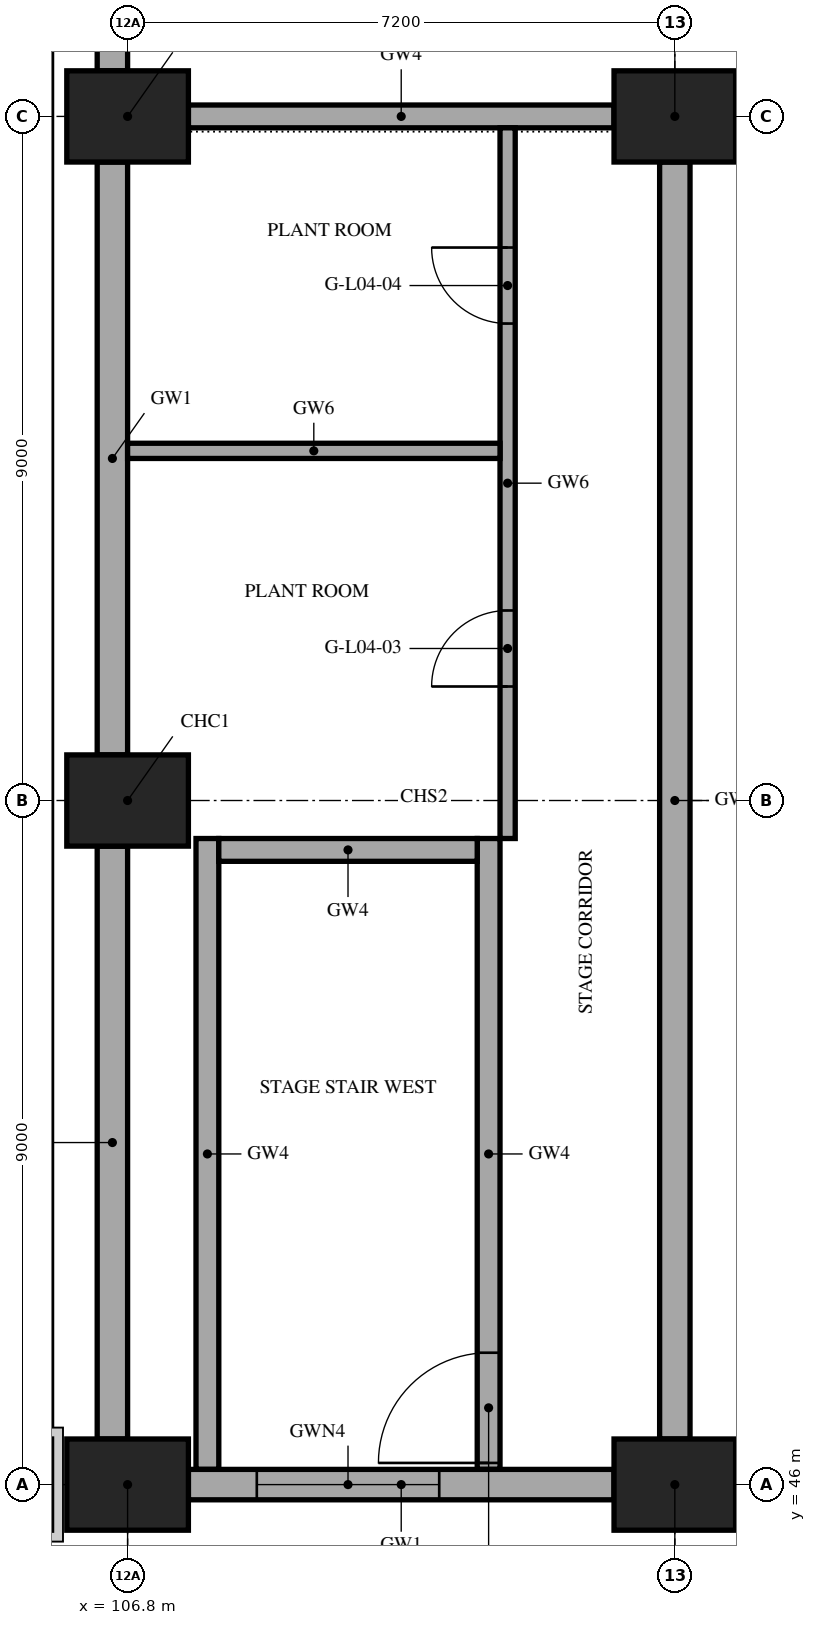
"""IFC4 building model, lengths in metres.
Left out: names, types, materials, properties, quantities, classifications, styles, units other than length and angle.
Written with IfcOpenShell. Run it as: python <this file> out.ifc"""

import sys

from ifc_helpers import new_model, si_unit, direction, frame, frame_2d, origin, origin_2d, place, context, subcontext, project, spatial, rectangle, extrude, element, fill, save


model = new_model("IFC4")
c1 = context("Model", 3, precision=1e-05, world=origin(), true_north=direction((0.0, 1.0)))
c2 = subcontext(c1, "Body", "Model", "MODEL_VIEW")
j1 = project(units=[si_unit("LENGTHUNIT", "METRE"), si_unit("PLANEANGLEUNIT", "RADIAN")], contexts=[c1])
p1 = place(None, origin())
s1 = spatial("IfcSite", under=j1, at=p1, CompositionType="ELEMENT")
p2 = place(p1, origin())
s2 = spatial("IfcBuilding", under=s1, at=p2, CompositionType="ELEMENT")
p3 = place(p2, frame((0.0, 0.0, 19.2)))
s3 = spatial("IfcBuildingStorey", under=s2, at=p3, CompositionType="ELEMENT", Elevation=19.2)
for number, where, z_axis, x_axis in (
    (1, (106.8, 46.0, 0.0), (0.0, 0.0, 1.0), (1.0, 0.0, 0.0)),
    (2, (114.0, 46.0, 0.0), (0.0, 0.0, 1.0), (1.0, 0.0, 0.0)),
    (3, (106.8, 55.0, 0.0), (0.0, 0.0, 1.0), (1.0, 0.0, 0.0)),
    (4, (106.8, 64.0, 0.0), (0.0, 0.0, 1.0), (1.0, 0.0, 0.0)),
    (5, (114.0, 64.0, 0.0), (0.0, 0.0, 1.0), (1.0, 0.0, 0.0)),
):
    element("IfcColumn", number, at=place(p3, frame(where, z_axis=z_axis, x_axis=x_axis)), inside=s3, PredefinedType="COLUMN", context=c2, shape_type="SweptSolid", body=[
        extrude(rectangle(XDim=1.6, YDim=1.2, at=origin_2d()), origin(), (0.0, 0.0, 1.0), 4.2),
    ])
p4 = place(p3, frame((114.0, 46.6, 0.0), z_axis=(0.0, 0.0, 1.0), x_axis=(0.0, 1.0, 0.0)))
e6 = element("IfcWall", 6, at=p4, inside=s3, PredefinedType="SHEAR", context=c2, shape_type="SweptSolid", body=[
    extrude(rectangle(XDim=16.8, YDim=0.4, at=frame_2d((8.4, 0.0))), origin(), (0.0, 0.0, 1.0), 4.2),
])
p5 = place(p3, frame((107.6, 64.0, 0.0), z_axis=(0.0, 0.0, 1.0), x_axis=(1.0, 0.0, 0.0)))
e7 = element("IfcWall", 7, at=p5, inside=s3, PredefinedType="SHEAR", context=c2, shape_type="SweptSolid", body=[
    extrude(rectangle(XDim=5.6, YDim=0.3, at=frame_2d((2.8, 0.0))), origin(), (0.0, 0.0, 1.0), 4.2),
])
p6 = place(p3, frame((107.85, 46.2, 0.0), z_axis=(0.0, 0.0, 1.0), x_axis=(0.0, 1.0, 0.0)))
e8 = element("IfcWall", 8, at=p6, inside=s3, PredefinedType="SHEAR", context=c2, shape_type="SweptSolid", body=[
    extrude(rectangle(XDim=8.3, YDim=0.3, at=frame_2d((4.15, 0.0))), origin(), (0.0, 0.0, 1.0), 4.2),
])
p7 = place(p3, frame((111.55, 46.2, 0.0), z_axis=(0.0, 0.0, 1.0), x_axis=(0.0, 1.0, 0.0)))
e9 = element("IfcWall", 9, at=p7, inside=s3, PredefinedType="SHEAR", context=c2, shape_type="SweptSolid", body=[
    extrude(rectangle(XDim=8.3, YDim=0.3, at=frame_2d((4.15, 0.0))), origin(), (0.0, 0.0, 1.0), 4.2),
])
p8 = place(p7, frame((0.085, 0.0, 0.0)))
e10 = element("IfcOpeningElement", 10, at=p8, cuts=e9, PredefinedType="OPENING", context=c2, shape_type="SweptSolid", body=[
    extrude(rectangle(XDim=1.45, YDim=2.1, at=frame_2d((0.725, 1.05))), frame((0.0, 0.16, 0.0), z_axis=(0.0, -1.0, 0.0), x_axis=(1.0, 0.0, 0.0)), (0.0, 0.0, 1.0), 0.32),
])
p9 = place(p3, frame((108.0, 54.35, 0.0), z_axis=(0.0, 0.0, 1.0), x_axis=(1.0, 0.0, 0.0)))
e11 = element("IfcWall", 11, at=p9, inside=s3, PredefinedType="SHEAR", context=c2, shape_type="SweptSolid", body=[
    extrude(rectangle(XDim=3.4, YDim=0.3, at=frame_2d((1.7, 0.0))), origin(), (0.0, 0.0, 1.0), 4.2),
])
for number, where, z_axis, x_axis in (
    (12, (106.6, 46.6, 0.0), (0.0, 0.0, 1.0), (0.0, 1.0, 0.0)),
    (13, (106.6, 55.6, 0.0), (0.0, 0.0, 1.0), (0.0, 1.0, 0.0)),
):
    element("IfcWall", number, at=place(p3, frame(where, z_axis=z_axis, x_axis=x_axis)), inside=s3, PredefinedType="SOLIDWALL", context=c2, shape_type="SweptSolid", body=[
        extrude(rectangle(XDim=7.8, YDim=0.4, at=frame_2d((3.9, 0.0))), origin(), (0.0, 0.0, 1.0), 4.2),
    ])
p10 = place(p3, frame((106.6, 64.6, 0.0), z_axis=(0.0, 0.0, 1.0), x_axis=(0.0, 1.0, 0.0)))
e14 = element("IfcWall", 14, at=p10, inside=s3, PredefinedType="SOLIDWALL", context=c2, shape_type="SweptSolid", body=[
    extrude(rectangle(XDim=7.8, YDim=0.4, at=frame_2d((3.9, 0.0))), origin(), (0.0, 0.0, 1.0), 4.2),
])
p11 = place(p10, frame((0.9, 0.0, 2.4)))
e15 = element("IfcOpeningElement", 15, at=p11, cuts=e14, PredefinedType="OPENING", context=c2, shape_type="SweptSolid", body=[
    extrude(rectangle(XDim=6.0, YDim=1.4, at=frame_2d((3.0, 0.7))), frame((0.0, 0.21, 0.0), z_axis=(0.0, -1.0, 0.0), x_axis=(1.0, 0.0, 0.0)), (0.0, 0.0, 1.0), 0.42),
])
p12 = place(p3, frame((107.6, 46.0, 0.0), z_axis=(0.0, 0.0, 1.0), x_axis=(1.0, 0.0, 0.0)))
e16 = element("IfcWall", 16, at=p12, inside=s3, PredefinedType="SOLIDWALL", context=c2, shape_type="SweptSolid", body=[
    extrude(rectangle(XDim=5.6, YDim=0.4, at=frame_2d((2.8, 0.0))), origin(), (0.0, 0.0, 1.0), 4.2),
])
p13 = place(p12, frame((0.9, 0.0, 1.2)))
e17 = element("IfcOpeningElement", 17, at=p13, cuts=e16, PredefinedType="OPENING", context=c2, shape_type="SweptSolid", body=[
    extrude(rectangle(XDim=2.4, YDim=1.8, at=frame_2d((1.2, 0.9))), frame((0.0, 0.21, 0.0), z_axis=(0.0, -1.0, 0.0), x_axis=(1.0, 0.0, 0.0)), (0.0, 0.0, 1.0), 0.42),
])
p14 = place(p3, frame((111.8, 54.5, 0.0), z_axis=(0.0, 0.0, 1.0), x_axis=(0.0, 1.0, 0.0)))
e18 = element("IfcWall", 18, at=p14, inside=s3, PredefinedType="PARTITIONING", context=c2, shape_type="SweptSolid", body=[
    extrude(rectangle(XDim=9.35, YDim=0.2, at=frame_2d((4.675, 0.0))), origin(), (0.0, 0.0, 1.0), 4.2),
])
p15 = place(p14, frame((2.0, 0.0, 0.0)))
e19 = element("IfcOpeningElement", 19, at=p15, cuts=e18, PredefinedType="OPENING", context=c2, shape_type="SweptSolid", body=[
    extrude(rectangle(XDim=1.0, YDim=2.1, at=frame_2d((0.5, 1.05))), frame((0.0, 0.11, 0.0), z_axis=(0.0, -1.0, 0.0), x_axis=(1.0, 0.0, 0.0)), (0.0, 0.0, 1.0), 0.22),
])
p16 = place(p14, frame((6.775, 0.0, 0.0)))
e20 = element("IfcOpeningElement", 20, at=p16, cuts=e18, PredefinedType="OPENING", context=c2, shape_type="SweptSolid", body=[
    extrude(rectangle(XDim=1.0, YDim=2.1, at=frame_2d((0.5, 1.05))), frame((0.0, 0.11, 0.0), z_axis=(0.0, -1.0, 0.0), x_axis=(1.0, 0.0, 0.0)), (0.0, 0.0, 1.0), 0.22),
])
p17 = place(p3, frame((106.8, 59.6, 0.0), z_axis=(0.0, 0.0, 1.0), x_axis=(1.0, 0.0, 0.0)))
e21 = element("IfcWall", 21, at=p17, inside=s3, PredefinedType="PARTITIONING", context=c2, shape_type="SweptSolid", body=[
    extrude(rectangle(XDim=4.9, YDim=0.2, at=frame_2d((2.45, 0.0))), origin(), (0.0, 0.0, 1.0), 4.2),
])
p18 = place(p13, origin())
e22 = element("IfcWindow", 22, at=p18, inside=s3, PartitioningType="SINGLE_PANEL", PredefinedType="WINDOW", context=c2, shape_type="SweptSolid", body=[
    extrude(rectangle(XDim=2.4, YDim=1.8, at=frame_2d((1.2, 0.9))), frame((0.0, 0.03, 0.0), z_axis=(0.0, -1.0, 0.0), x_axis=(1.0, 0.0, 0.0)), (0.0, 0.0, 1.0), 0.06),
])
fill(e17, e22)
p19 = place(p8, origin())
e23 = element("IfcDoor", 23, at=p19, inside=s3, OperationType="SINGLE_SWING_LEFT", PredefinedType="DOOR", context=c2, shape_type="SweptSolid", body=[
    extrude(rectangle(XDim=1.45, YDim=2.1, at=frame_2d((0.725, 1.05))), frame((0.0, 0.025, 0.0), z_axis=(0.0, -1.0, 0.0), x_axis=(1.0, 0.0, 0.0)), (0.0, 0.0, 1.0), 0.05),
])
fill(e10, e23)
p20 = place(p15, origin())
e24 = element("IfcDoor", 24, at=p20, inside=s3, OperationType="SINGLE_SWING_LEFT", PredefinedType="DOOR", context=c2, shape_type="SweptSolid", body=[
    extrude(rectangle(XDim=1.0, YDim=2.1, at=frame_2d((0.5, 1.05))), frame((0.0, 0.025, 0.0), z_axis=(0.0, -1.0, 0.0), x_axis=(1.0, 0.0, 0.0)), (0.0, 0.0, 1.0), 0.05),
])
fill(e19, e24)
p21 = place(p16, origin())
e25 = element("IfcDoor", 25, at=p21, inside=s3, OperationType="SINGLE_SWING_RIGHT", PredefinedType="DOOR", context=c2, shape_type="SweptSolid", body=[
    extrude(rectangle(XDim=1.0, YDim=2.1, at=frame_2d((0.5, 1.05))), frame((0.0, 0.025, 0.0), z_axis=(0.0, -1.0, 0.0), x_axis=(1.0, 0.0, 0.0)), (0.0, 0.0, 1.0), 0.05),
])
fill(e20, e25)
save(model, sys.argv[1])
